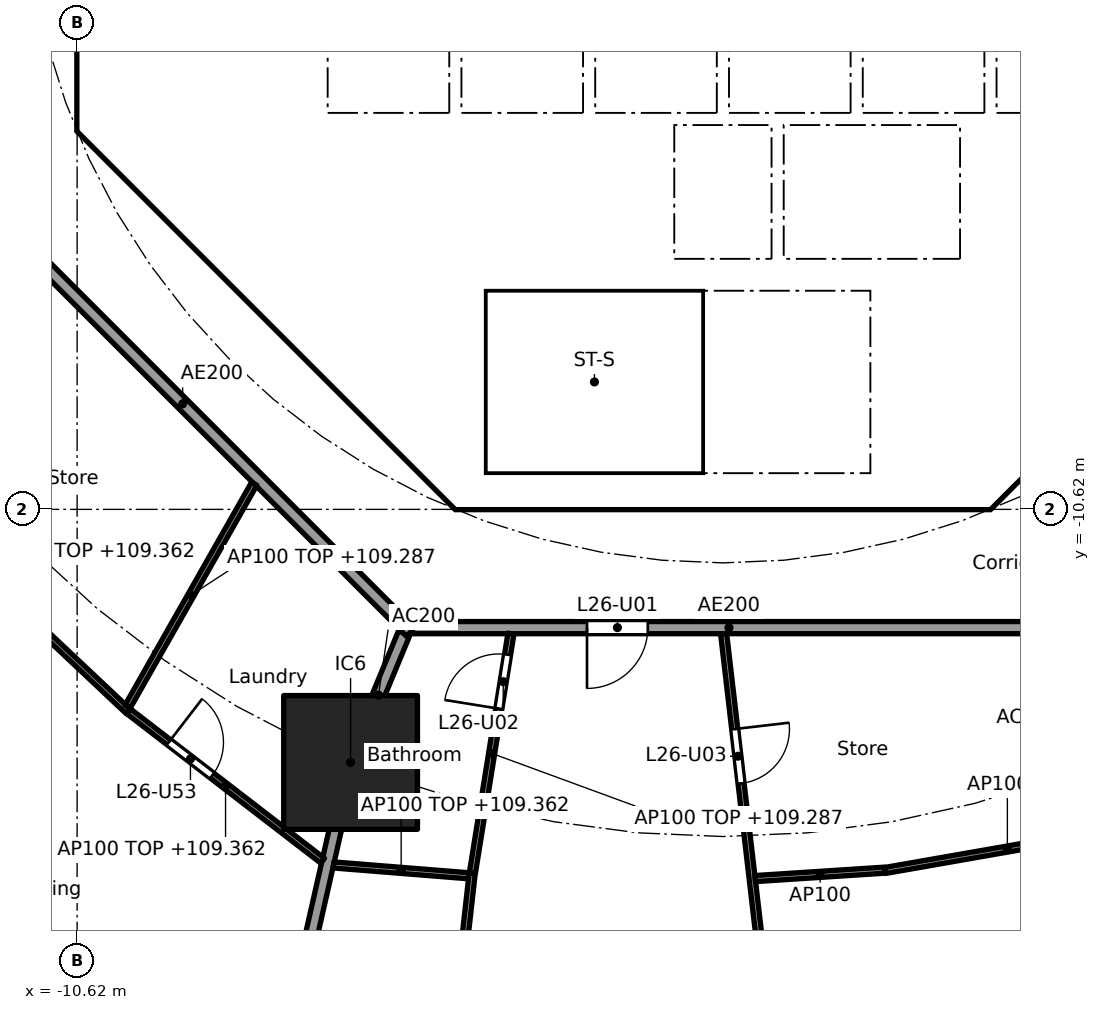
"""IFC4 building model, lengths in metres.
Left out: names, types, materials, properties, quantities, classifications, styles, units other than length and angle.
Written with IfcOpenShell. Run it as: python <this file> out.ifc"""

import sys

from ifc_helpers import new_model, si_unit, direction, frame, frame_2d, origin, origin_2d, place, context, subcontext, project, spatial, polyline, rectangle, outline, extrude, element, fill, save


model = new_model("IFC4")
c1 = context("Model", 3, precision=1e-05, world=origin(), true_north=direction((0.0, 1.0)))
c2 = subcontext(c1, "Body", "Model", "MODEL_VIEW")
j1 = project(units=[si_unit("LENGTHUNIT", "METRE"), si_unit("PLANEANGLEUNIT", "RADIAN")], contexts=[c1])
p1 = place(None, origin())
s1 = spatial("IfcSite", under=j1, at=p1, CompositionType="ELEMENT")
p2 = place(p1, origin())
s2 = spatial("IfcBuilding", under=s1, at=p2, CompositionType="ELEMENT")
p3 = place(p2, frame((0.0, 0.0, 106.6)))
s3 = spatial("IfcBuildingStorey", under=s2, at=p3, CompositionType="ELEMENT", Elevation=106.6)
p4 = place(p3, frame((-6.123, -14.782, 0.0), z_axis=(0.0, 0.0, 1.0), x_axis=(1.0, 0.0, 0.0)))
e1 = element("IfcColumn", 1, at=p4, inside=s3, PredefinedType="COLUMN", context=c2, shape_type="SweptSolid", body=[
    extrude(rectangle(XDim=2.2, YDim=2.2, at=origin_2d()), origin(), (0.0, 0.0, 1.0), 3.7),
])
p5 = place(p3, frame((-10.325, 3.801, 0.0), z_axis=(0.0, 0.0, 1.0), x_axis=(0.0, -1.0, 0.0)))
e2 = element("IfcWall", 2, at=p5, inside=s3, PredefinedType="SHEAR", context=c2, shape_type="SweptSolid", body=[
    extrude(rectangle(XDim=7.602, YDim=0.6, at=frame_2d((3.801, 0.0))), origin(), (0.0, 0.0, 1.0), 3.44),
])
p6 = place(p5, frame((0.651, 0.0, 0.0)))
e3 = element("IfcOpeningElement", 3, at=p6, cuts=e2, PredefinedType="OPENING", context=c2, shape_type="SweptSolid", body=[
    extrude(rectangle(XDim=1.5, YDim=2.1, at=frame_2d((0.75, 1.05))), frame((0.0, 0.31, 0.0), z_axis=(0.0, -1.0, 0.0), x_axis=(1.0, 0.0, 0.0)), (0.0, 0.0, 1.0), 0.62),
])
p7 = place(p5, frame((5.451, 0.0, 0.0)))
e4 = element("IfcOpeningElement", 4, at=p7, cuts=e2, PredefinedType="OPENING", context=c2, shape_type="SweptSolid", body=[
    extrude(rectangle(XDim=1.5, YDim=2.1, at=frame_2d((0.75, 1.05))), frame((0.0, 0.31, 0.0), z_axis=(0.0, -1.0, 0.0), x_axis=(1.0, 0.0, 0.0)), (0.0, 0.0, 1.0), 0.62),
])
p8 = place(p3, frame((-9.988, -4.613, 0.0), z_axis=(0.0, 0.0, 1.0), x_axis=(0.707106781187, -0.707106781187, 0.0)))
e5 = element("IfcWall", 5, at=p8, inside=s3, PredefinedType="SHEAR", context=c2, shape_type="SweptSolid", body=[
    extrude(rectangle(XDim=7.602, YDim=0.6, at=frame_2d((3.801, 0.0))), origin(), (0.0, 0.0, 1.0), 3.44),
])
p9 = place(p8, frame((6.151, 0.0, 0.0)))
e6 = element("IfcOpeningElement", 6, at=p9, cuts=e5, PredefinedType="OPENING", context=c2, shape_type="SweptSolid", body=[
    extrude(rectangle(XDim=1.1, YDim=2.1, at=frame_2d((0.55, 1.05))), frame((0.0, 0.31, 0.0), z_axis=(0.0, -1.0, 0.0), x_axis=(1.0, 0.0, 0.0)), (0.0, 0.0, 1.0), 0.62),
])
p10 = place(p3, frame((4.613, -9.988, 0.0), z_axis=(0.0, 0.0, 1.0), x_axis=(0.707106781187, 0.707106781187, 0.0)))
e7 = element("IfcWall", 7, at=p10, inside=s3, PredefinedType="SHEAR", context=c2, shape_type="SweptSolid", body=[
    extrude(rectangle(XDim=7.602, YDim=0.6, at=frame_2d((3.801, 0.0))), origin(), (0.0, 0.0, 1.0), 3.44),
])
p11 = place(p10, frame((3.201, 0.0, 0.0)))
e8 = element("IfcOpeningElement", 8, at=p11, cuts=e7, PredefinedType="OPENING", context=c2, shape_type="SweptSolid", body=[
    extrude(rectangle(XDim=1.2, YDim=2.1, at=frame_2d((0.6, 1.05))), frame((0.0, 0.31, 0.0), z_axis=(0.0, -1.0, 0.0), x_axis=(1.0, 0.0, 0.0)), (0.0, 0.0, 1.0), 0.62),
])
p12 = place(p3, frame((4.0, -10.025, 0.0), z_axis=(0.0, 0.0, 1.0), x_axis=(0.0, 1.0, 0.0)))
e9 = element("IfcWall", 9, at=p12, inside=s3, PredefinedType="SOLIDWALL", context=c2, shape_type="SweptSolid", body=[
    extrude(rectangle(XDim=3.0, YDim=0.2, at=frame_2d((1.5, 0.0))), origin(), (0.0, 0.0, 1.0), 3.44),
])
p13 = place(p12, frame((0.975, 0.0, 0.0)))
e10 = element("IfcOpeningElement", 10, at=p13, cuts=e9, PredefinedType="OPENING", context=c2, shape_type="SweptSolid", body=[
    extrude(rectangle(XDim=1.1, YDim=2.1, at=frame_2d((0.55, 1.05))), frame((0.0, 0.11, 0.0), z_axis=(0.0, -1.0, 0.0), x_axis=(1.0, 0.0, 0.0)), (0.0, 0.0, 1.0), 0.22),
])
p14 = place(p3, frame((-5.8, -8.227, 0.0), z_axis=(0.0, 0.0, 1.0), x_axis=(0.0, 1.0, 0.0)))
e11 = element("IfcWall", 11, at=p14, inside=s3, PredefinedType="PARTITIONING", context=c2, shape_type="SweptSolid", body=[
    extrude(rectangle(XDim=3.927, YDim=0.15, at=frame_2d((1.963, 0.0))), origin(), (0.0, 0.0, 1.0), 3.44),
])
p15 = place(p14, frame((2.615, 0.0, 0.0)))
e12 = element("IfcOpeningElement", 12, at=p15, cuts=e11, PredefinedType="OPENING", context=c2, shape_type="SweptSolid", body=[
    extrude(rectangle(XDim=0.9, YDim=2.1, at=frame_2d((0.45, 1.05))), frame((0.0, 0.085, 0.0), z_axis=(0.0, -1.0, 0.0), x_axis=(1.0, 0.0, 0.0)), (0.0, 0.0, 1.0), 0.17),
])
p16 = place(p14, frame((0.539, 0.0, 0.0)))
e13 = element("IfcOpeningElement", 13, at=p16, cuts=e11, PredefinedType="OPENING", context=c2, shape_type="SweptSolid", body=[
    extrude(rectangle(XDim=0.9, YDim=2.1, at=frame_2d((0.45, 1.05))), frame((0.0, 0.085, 0.0), z_axis=(0.0, -1.0, 0.0), x_axis=(1.0, 0.0, 0.0)), (0.0, 0.0, 1.0), 0.17),
])
p17 = place(p3, frame((4.0, -6.5, 0.0), z_axis=(0.0, 0.0, 1.0), x_axis=(0.0, 1.0, 0.0)))
e14 = element("IfcWall", 14, at=p17, inside=s3, PredefinedType="SOLIDWALL", context=c2, shape_type="SweptSolid", body=[
    extrude(rectangle(XDim=2.2, YDim=0.2, at=frame_2d((1.1, 0.0))), origin(), (0.0, 0.0, 1.0), 3.44),
])
p18 = place(p17, frame((0.55, 0.0, 0.0)))
e15 = element("IfcOpeningElement", 15, at=p18, cuts=e14, PredefinedType="OPENING", context=c2, shape_type="SweptSolid", body=[
    extrude(rectangle(XDim=1.1, YDim=2.1, at=frame_2d((0.55, 1.05))), frame((0.0, 0.11, 0.0), z_axis=(0.0, -1.0, 0.0), x_axis=(1.0, 0.0, 0.0)), (0.0, 0.0, 1.0), 0.22),
])
p19 = place(p3, frame((-4.0, -6.5, 0.0), z_axis=(0.0, 0.0, 1.0), x_axis=(0.0, 1.0, 0.0)))
e16 = element("IfcWall", 16, at=p19, inside=s3, PredefinedType="SOLIDWALL", context=c2, shape_type="SweptSolid", body=[
    extrude(rectangle(XDim=2.2, YDim=0.2, at=frame_2d((1.1, 0.0))), origin(), (0.0, 0.0, 1.0), 3.44),
])
p20 = place(p19, frame((0.65, 0.0, 0.0)))
e17 = element("IfcOpeningElement", 17, at=p20, cuts=e16, PredefinedType="OPENING", context=c2, shape_type="SweptSolid", body=[
    extrude(rectangle(XDim=0.9, YDim=2.1, at=frame_2d((0.45, 1.05))), frame((0.0, 0.11, 0.0), z_axis=(0.0, -1.0, 0.0), x_axis=(1.0, 0.0, 0.0)), (0.0, 0.0, 1.0), 0.22),
])
p21 = place(p3, origin())
e18 = element("IfcWall", 18, at=p21, inside=s3, PredefinedType="SHEAR", context=c2, shape_type="SweptSolid", body=[
    extrude(outline(polyline([(-10.625, -3.801), (-10.025, -3.801), (-10.025, -4.152), (-9.776, -4.401), (-10.2, -4.825), (-10.625, -4.401), (-10.625, -3.801)])), origin(), (0.0, 0.0, 1.0), 3.44),
])
p22 = place(p3, origin())
e19 = element("IfcWall", 19, at=p22, inside=s3, PredefinedType="SHEAR", context=c2, shape_type="SweptSolid", body=[
    extrude(outline(polyline([(-4.152, -10.025), (4.152, -10.025), (4.401, -9.776), (4.825, -10.2), (4.401, -10.625), (-4.401, -10.625), (-4.825, -10.2), (-4.401, -9.776), (-4.152, -10.025)])), origin(), (0.0, 0.0, 1.0), 3.44),
])
p23 = place(p3, frame((-10.025, -4.0, 0.0), z_axis=(0.0, 0.0, 1.0), x_axis=(1.0, 0.0, 0.0)))
e20 = element("IfcWall", 20, at=p23, inside=s3, PredefinedType="PARTITIONING", context=c2, shape_type="SweptSolid", body=[
    extrude(rectangle(XDim=3.325, YDim=0.2, at=frame_2d((1.662, 0.0))), origin(), (0.0, 0.0, 1.0), 3.44),
])
p24 = place(p3, frame((-8.001, -6.1, 0.0), z_axis=(0.0, 0.0, 1.0), x_axis=(1.0, 0.0, 0.0)))
e21 = element("IfcWall", 21, at=p24, inside=s3, PredefinedType="PARTITIONING", context=c2, shape_type="SweptSolid", body=[
    extrude(rectangle(XDim=2.126, YDim=0.15, at=frame_2d((1.063, 0.0))), origin(), (0.0, 0.0, 1.0), 3.44),
])
for number, where, z_axis, x_axis in (
    (22, (-0.9, -6.5, 0.0), (0.0, 0.0, 1.0), (0.0, 1.0, 0.0)),
    (23, (0.9, -6.5, 0.0), (0.0, 0.0, 1.0), (0.0, 1.0, 0.0)),
):
    element("IfcWall", number, at=place(p3, frame(where, z_axis=z_axis, x_axis=x_axis)), inside=s3, PredefinedType="SOLIDWALL", context=c2, shape_type="SweptSolid", body=[
        extrude(rectangle(XDim=2.2, YDim=0.2, at=frame_2d((1.1, 0.0))), origin(), (0.0, 0.0, 1.0), 3.44),
    ])
p25 = place(p3, origin())
e24 = element("IfcWall", 24, at=p25, inside=s3, PredefinedType="SOLIDWALL", context=c2, shape_type="SweptSolid", body=[
    extrude(outline(polyline([(-6.7, -2.1), (-6.5, -2.1), (-6.5, -4.1), (-4.5, -4.1), (-4.5, -2.1), (-4.3, -2.1), (-4.3, -4.1), (-2.3, -4.1), (-2.3, -2.1), (-2.1, -2.1), (-2.1, -4.1), (-0.1, -4.1), (-0.1, -2.1), (0.1, -2.1), (0.1, -4.1), (2.1, -4.1), (2.1, -2.1), (2.3, -2.1), (2.3, -4.1), (4.3, -4.1), (4.3, -2.1), (4.5, -2.1), (4.5, -4.1), (6.5, -4.1), (6.5, -2.1), (6.7, -2.1), (6.7, -4.3), (-6.7, -4.3), (-6.7, -2.1)])), origin(), (0.0, 0.0, 1.0), 3.44),
])
p26 = place(p3, origin())
e25 = element("IfcWall", 25, at=p26, inside=s3, PredefinedType="SOLIDWALL", context=c2, shape_type="SweptSolid", body=[
    extrude(outline(polyline([(-3.9, -10.025), (-4.1, -10.025), (-4.1, -7.025), (-3.9, -7.025), (-3.9, -10.025)])), origin(), (0.0, 0.0, 1.0), 3.44),
])
p27 = place(p3, origin())
e26 = element("IfcWall", 26, at=p27, inside=s3, PredefinedType="SOLIDWALL", context=c2, shape_type="SweptSolid", body=[
    extrude(outline(polyline([(4.1, -7.025), (-4.1, -7.025), (-4.1, -6.5), (4.1, -6.5), (4.1, -7.025)])), origin(), (0.0, 0.0, 1.0), 3.44),
])
p28 = place(p3, frame((-5.243, -12.657, 0.0), z_axis=(0.0, 0.0, 1.0), x_axis=(-0.382668627144, -0.923885664896, 0.0)))
e27 = element("IfcWall", 27, at=p28, inside=s3, PredefinedType="PARTITIONING", context=c2, shape_type="SweptSolid", body=[
    extrude(rectangle(XDim=2.2, YDim=0.2, at=frame_2d((1.1, 0.0))), origin(), (0.0, 0.0, 1.0), 3.44),
])
p29 = place(p3, frame((-6.134, -14.831, 0.0), z_axis=(0.0, 0.0, 1.0), x_axis=(-0.221225405869, -0.975222702667, 0.0)))
e28 = element("IfcWall", 28, at=p29, inside=s3, PredefinedType="PARTITIONING", context=c2, shape_type="SweptSolid", body=[
    extrude(rectangle(XDim=11.761, YDim=0.2, at=frame_2d((5.88, 0.0))), origin(), (0.0, 0.0, 1.0), 2.762),
])
p30 = place(p3, frame((-12.635, -5.134, 0.0), z_axis=(0.0, 0.0, 1.0), x_axis=(0.707106781187, -0.707106781187, 0.0)))
e29 = element("IfcWall", 29, at=p30, inside=s3, PredefinedType="PARTITIONING", context=c2, shape_type="SweptSolid", body=[
    extrude(rectangle(XDim=10.609, YDim=0.2, at=frame_2d((5.305, 0.0))), origin(), (0.0, 0.0, 1.0), 3.44),
])
p31 = place(p3, frame((-5.104, -12.565, 0.0), z_axis=(0.0, 0.0, 1.0), x_axis=(1.0, 0.0, 0.0)))
e30 = element("IfcWall", 30, at=p31, inside=s3, PredefinedType="PARTITIONING", context=c2, shape_type="SweptSolid", body=[
    extrude(rectangle(XDim=10.409, YDim=0.2, at=frame_2d((5.205, 0.0))), origin(), (0.0, 0.0, 1.0), 3.44),
])
p32 = place(p31, frame((2.87, 0.0, 0.0)))
e31 = element("IfcOpeningElement", 31, at=p32, cuts=e30, PredefinedType="OPENING", context=c2, shape_type="SweptSolid", body=[
    extrude(rectangle(XDim=1.0, YDim=2.1, at=frame_2d((0.5, 1.05))), frame((0.0, 0.11, 0.0), z_axis=(0.0, -1.0, 0.0), x_axis=(1.0, 0.0, 0.0)), (0.0, 0.0, 1.0), 0.22),
])
p33 = place(p3, frame((-13.118, -10.8, 0.0), z_axis=(0.0, 0.0, 1.0), x_axis=(0.72818280142, -0.685382964273, 0.0)))
e32 = element("IfcWall", 32, at=p33, inside=s3, PredefinedType="PARTITIONING", context=c2, shape_type="SweptSolid", body=[
    extrude(rectangle(XDim=4.586, YDim=0.1, at=frame_2d((2.293, 0.0))), origin(), (0.0, 0.0, 1.0), 2.762),
])
p34 = place(p3, frame((-7.707, -10.198, 0.0), z_axis=(0.0, 0.0, 1.0), x_axis=(-0.493986531217, -0.869469554945, 0.0)))
e33 = element("IfcWall", 33, at=p34, inside=s3, PredefinedType="PARTITIONING", context=c2, shape_type="SweptSolid", body=[
    extrude(rectangle(XDim=4.217, YDim=0.1, at=frame_2d((2.109, 0.0))), origin(), (0.0, 0.0, 1.0), 2.687),
])
p35 = place(p3, frame((-9.775, -13.939, 0.0), z_axis=(0.0, 0.0, 1.0), x_axis=(0.792162117554, -0.610310723741, 0.0)))
e34 = element("IfcWall", 34, at=p35, inside=s3, PredefinedType="PARTITIONING", context=c2, shape_type="SweptSolid", body=[
    extrude(rectangle(XDim=4.03, YDim=0.1, at=frame_2d((2.015, 0.0))), origin(), (0.0, 0.0, 1.0), 2.762),
])
p36 = place(p35, frame((0.836, 0.0, 0.0)))
e35 = element("IfcOpeningElement", 35, at=p36, cuts=e34, PredefinedType="OPENING", context=c2, shape_type="SweptSolid", body=[
    extrude(rectangle(XDim=0.9, YDim=2.1, at=frame_2d((0.45, 1.05))), frame((0.0, 0.06, 0.0), z_axis=(0.0, -1.0, 0.0), x_axis=(1.0, 0.0, 0.0)), (0.0, 0.0, 1.0), 0.12),
])
p37 = place(p3, frame((-6.404, -16.468, 0.0), z_axis=(0.0, 0.0, 1.0), x_axis=(0.996819101134, -0.079697425392, 0.0)))
e36 = element("IfcWall", 36, at=p37, inside=s3, PredefinedType="PARTITIONING", context=c2, shape_type="SweptSolid", body=[
    extrude(rectangle(XDim=2.233, YDim=0.1, at=frame_2d((1.117, 0.0))), origin(), (0.0, 0.0, 1.0), 2.762),
])
p38 = place(p3, frame((-3.486, -12.664, 0.0), z_axis=(0.0, 0.0, 1.0), x_axis=(-0.159124641548, -0.987258501332, 0.0)))
e37 = element("IfcWall", 37, at=p38, inside=s3, PredefinedType="PARTITIONING", context=c2, shape_type="SweptSolid", body=[
    extrude(rectangle(XDim=3.988, YDim=0.1, at=frame_2d((1.994, 0.0))), origin(), (0.0, 0.0, 1.0), 2.687),
])
p39 = place(p38, frame((0.35, 0.0, 0.0)))
e38 = element("IfcOpeningElement", 38, at=p39, cuts=e37, PredefinedType="OPENING", context=c2, shape_type="SweptSolid", body=[
    extrude(rectangle(XDim=0.9, YDim=2.1, at=frame_2d((0.45, 1.05))), frame((0.0, 0.06, 0.0), z_axis=(0.0, -1.0, 0.0), x_axis=(1.0, 0.0, 0.0)), (0.0, 0.0, 1.0), 0.12),
])
p40 = place(p3, frame((-4.122, -16.6, 0.0), z_axis=(0.0, 0.0, 1.0), x_axis=(-0.111357928679, -0.993780363924, 0.0)))
e39 = element("IfcWall", 39, at=p40, inside=s3, PredefinedType="PARTITIONING", context=c2, shape_type="SweptSolid", body=[
    extrude(rectangle(XDim=5.409, YDim=0.1, at=frame_2d((2.704, 0.0))), origin(), (0.0, 0.0, 1.0), 3.44),
])
p41 = place(p40, frame((2.279, 0.0, 0.0)))
e40 = element("IfcOpeningElement", 40, at=p41, cuts=e39, PredefinedType="OPENING", context=c2, shape_type="SweptSolid", body=[
    extrude(rectangle(XDim=0.9, YDim=2.1, at=frame_2d((0.45, 1.05))), frame((0.0, 0.06, 0.0), z_axis=(0.0, -1.0, 0.0), x_axis=(1.0, 0.0, 0.0)), (0.0, 0.0, 1.0), 0.12),
])
p42 = place(p3, frame((0.011, -12.664, 0.0), z_axis=(0.0, 0.0, 1.0), x_axis=(0.115841404661, -0.993267722704, 0.0)))
e41 = element("IfcWall", 41, at=p42, inside=s3, PredefinedType="PARTITIONING", context=c2, shape_type="SweptSolid", body=[
    extrude(rectangle(XDim=15.528, YDim=0.1, at=frame_2d((7.764, 0.0))), origin(), (0.0, 0.0, 1.0), 2.687),
])
p43 = place(p42, frame((1.579, 0.0, 0.0)))
e42 = element("IfcOpeningElement", 42, at=p43, cuts=e41, PredefinedType="OPENING", context=c2, shape_type="SweptSolid", body=[
    extrude(rectangle(XDim=0.9, YDim=2.1, at=frame_2d((0.45, 1.05))), frame((0.0, 0.06, 0.0), z_axis=(0.0, -1.0, 0.0), x_axis=(1.0, 0.0, 0.0)), (0.0, 0.0, 1.0), 0.12),
])
p44 = place(p42, frame((6.303, 0.0, 0.0)))
e43 = element("IfcOpeningElement", 43, at=p44, cuts=e41, PredefinedType="OPENING", context=c2, shape_type="SweptSolid", body=[
    extrude(rectangle(XDim=0.9, YDim=2.1, at=frame_2d((0.45, 1.05))), frame((0.0, 0.06, 0.0), z_axis=(0.0, -1.0, 0.0), x_axis=(1.0, 0.0, 0.0)), (0.0, 0.0, 1.0), 0.12),
])
p45 = place(p42, frame((12.038, 0.0, 0.0)))
e44 = element("IfcOpeningElement", 44, at=p45, cuts=e41, PredefinedType="OPENING", context=c2, shape_type="SweptSolid", body=[
    extrude(rectangle(XDim=0.9, YDim=2.1, at=frame_2d((0.45, 1.05))), frame((0.0, 0.06, 0.0), z_axis=(0.0, -1.0, 0.0), x_axis=(1.0, 0.0, 0.0)), (0.0, 0.0, 1.0), 0.12),
])
p46 = place(p3, frame((0.531, -16.691, 0.0), z_axis=(0.0, 0.0, 1.0), x_axis=(0.997895869517, 0.064836977109, 0.0)))
e45 = element("IfcWall", 45, at=p46, inside=s3, PredefinedType="PARTITIONING", context=c2, shape_type="SweptSolid", body=[
    extrude(rectangle(XDim=2.139, YDim=0.1, at=frame_2d((1.069, 0.0))), origin(), (0.0, 0.0, 1.0), 3.44),
])
p47 = place(p3, frame((2.667, -16.558, 0.0), z_axis=(0.0, 0.0, 1.0), x_axis=(0.984996445375, 0.172574629069, 0.0)))
e46 = element("IfcWall", 46, at=p47, inside=s3, PredefinedType="PARTITIONING", context=c2, shape_type="SweptSolid", body=[
    extrude(rectangle(XDim=4.084, YDim=0.1, at=frame_2d((2.042, 0.0))), origin(), (0.0, 0.0, 1.0), 2.762),
])
p48 = place(p18, origin())
e47 = element("IfcDoor", 47, at=p48, inside=s3, OperationType="DOUBLE_DOOR_SLIDING", PredefinedType="DOOR", context=c2, shape_type="SweptSolid", body=[
    extrude(rectangle(XDim=1.1, YDim=2.1, at=frame_2d((0.55, 1.05))), frame((0.0, 0.025, 0.0), z_axis=(0.0, -1.0, 0.0), x_axis=(1.0, 0.0, 0.0)), (0.0, 0.0, 1.0), 0.05),
])
fill(e15, e47)
p49 = place(p13, origin())
e48 = element("IfcDoor", 48, at=p49, inside=s3, OperationType="SINGLE_SWING_RIGHT", PredefinedType="DOOR", context=c2, shape_type="SweptSolid", body=[
    extrude(rectangle(XDim=1.1, YDim=2.1, at=frame_2d((0.55, 1.05))), frame((0.0, 0.025, 0.0), z_axis=(0.0, -1.0, 0.0), x_axis=(1.0, 0.0, 0.0)), (0.0, 0.0, 1.0), 0.05),
])
fill(e10, e48)
p50 = place(p15, origin())
e49 = element("IfcDoor", 49, at=p50, inside=s3, OperationType="SINGLE_SWING_RIGHT", PredefinedType="DOOR", context=c2, shape_type="SweptSolid", body=[
    extrude(rectangle(XDim=0.9, YDim=2.1, at=frame_2d((0.45, 1.05))), frame((0.0, 0.025, 0.0), z_axis=(0.0, -1.0, 0.0), x_axis=(1.0, 0.0, 0.0)), (0.0, 0.0, 1.0), 0.05),
])
fill(e12, e49)
p51 = place(p16, origin())
e50 = element("IfcDoor", 50, at=p51, inside=s3, OperationType="SINGLE_SWING_RIGHT", PredefinedType="DOOR", context=c2, shape_type="SweptSolid", body=[
    extrude(rectangle(XDim=0.9, YDim=2.1, at=frame_2d((0.45, 1.05))), frame((0.0, 0.025, 0.0), z_axis=(0.0, -1.0, 0.0), x_axis=(1.0, 0.0, 0.0)), (0.0, 0.0, 1.0), 0.05),
])
fill(e13, e50)
p52 = place(p20, frame((0.9, 0.0, 0.0), x_axis=(-1.0, 0.0, 0.0)))
e51 = element("IfcDoor", 51, at=p52, inside=s3, OperationType="SINGLE_SWING_RIGHT", PredefinedType="DOOR", context=c2, shape_type="SweptSolid", body=[
    extrude(rectangle(XDim=0.9, YDim=2.1, at=frame_2d((0.45, 1.05))), frame((0.0, 0.025, 0.0), z_axis=(0.0, -1.0, 0.0), x_axis=(1.0, 0.0, 0.0)), (0.0, 0.0, 1.0), 0.05),
])
fill(e17, e51)
p53 = place(p7, origin())
e52 = element("IfcDoor", 52, at=p53, inside=s3, OperationType="DOUBLE_DOOR_SINGLE_SWING", PredefinedType="DOOR", context=c2, shape_type="SweptSolid", body=[
    extrude(rectangle(XDim=1.5, YDim=2.1, at=frame_2d((0.75, 1.05))), frame((0.0, 0.025, 0.0), z_axis=(0.0, -1.0, 0.0), x_axis=(1.0, 0.0, 0.0)), (0.0, 0.0, 1.0), 0.05),
])
fill(e4, e52)
p54 = place(p9, origin())
e53 = element("IfcDoor", 53, at=p54, inside=s3, OperationType="SINGLE_SWING_RIGHT", PredefinedType="DOOR", context=c2, shape_type="SweptSolid", body=[
    extrude(rectangle(XDim=1.1, YDim=2.1, at=frame_2d((0.55, 1.05))), frame((0.0, 0.025, 0.0), z_axis=(0.0, -1.0, 0.0), x_axis=(1.0, 0.0, 0.0)), (0.0, 0.0, 1.0), 0.05),
])
fill(e6, e53)
p55 = place(p32, frame((1.0, 0.0, 0.0), x_axis=(-1.0, 0.0, 0.0)))
e54 = element("IfcDoor", 54, at=p55, inside=s3, OperationType="SINGLE_SWING_RIGHT", PredefinedType="DOOR", context=c2, shape_type="SweptSolid", body=[
    extrude(rectangle(XDim=1.0, YDim=2.1, at=frame_2d((0.5, 1.05))), frame((0.0, 0.025, 0.0), z_axis=(0.0, -1.0, 0.0), x_axis=(1.0, 0.0, 0.0)), (0.0, 0.0, 1.0), 0.05),
])
fill(e31, e54)
p56 = place(p39, frame((0.9, 0.0, 0.0), x_axis=(-1.0, 0.0, 0.0)))
e55 = element("IfcDoor", 55, at=p56, inside=s3, OperationType="SINGLE_SWING_LEFT", PredefinedType="DOOR", context=c2, shape_type="SweptSolid", body=[
    extrude(rectangle(XDim=0.9, YDim=2.1, at=frame_2d((0.45, 1.05))), frame((0.0, 0.025, 0.0), z_axis=(0.0, -1.0, 0.0), x_axis=(1.0, 0.0, 0.0)), (0.0, 0.0, 1.0), 0.05),
])
fill(e38, e55)
p57 = place(p43, origin())
e56 = element("IfcDoor", 56, at=p57, inside=s3, OperationType="SINGLE_SWING_LEFT", PredefinedType="DOOR", context=c2, shape_type="SweptSolid", body=[
    extrude(rectangle(XDim=0.9, YDim=2.1, at=frame_2d((0.45, 1.05))), frame((0.0, 0.025, 0.0), z_axis=(0.0, -1.0, 0.0), x_axis=(1.0, 0.0, 0.0)), (0.0, 0.0, 1.0), 0.05),
])
fill(e42, e56)
p58 = place(p36, origin())
e57 = element("IfcDoor", 57, at=p58, inside=s3, OperationType="SINGLE_SWING_LEFT", PredefinedType="DOOR", context=c2, shape_type="SweptSolid", body=[
    extrude(rectangle(XDim=0.9, YDim=2.1, at=frame_2d((0.45, 1.05))), frame((0.0, 0.025, 0.0), z_axis=(0.0, -1.0, 0.0), x_axis=(1.0, 0.0, 0.0)), (0.0, 0.0, 1.0), 0.05),
])
fill(e35, e57)
save(model, sys.argv[1])
